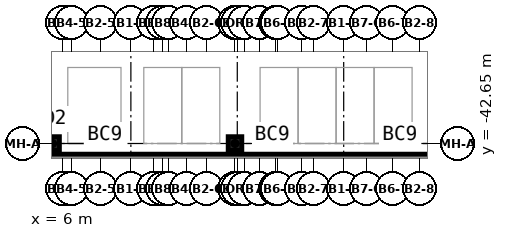
"""IFC4 building model, lengths in metres.
Left out: names, types, materials, properties, quantities, classifications, styles, units other than length and angle.
Written with IfcOpenShell. Run it as: python <this file> out.ifc"""

import sys

from ifc_helpers import new_model, si_unit, direction, frame, frame_2d, origin, origin_2d, place, context, subcontext, project, spatial, rectangle, extrude, source, transform, mapped, element, save


model = new_model("IFC4")
c1 = context("Model", 3, precision=1e-05, world=origin(), true_north=direction((0.0, 1.0)))
c2 = subcontext(c1, "Body", "Model", "MODEL_VIEW")
j1 = project(units=[si_unit("LENGTHUNIT", "METRE"), si_unit("PLANEANGLEUNIT", "RADIAN")], contexts=[c1])
p1 = place(None, origin())
s1 = spatial("IfcSite", under=j1, at=p1, CompositionType="ELEMENT")
p2 = place(p1, origin())
s2 = spatial("IfcBuilding", under=s1, at=p2, CompositionType="ELEMENT")
p3 = place(p2, frame((0.0, 0.0, -4.5)))
s3 = spatial("IfcBuildingStorey", under=s2, at=p3, CompositionType="ELEMENT", Elevation=-4.5)
m1 = source(origin(), c2, "Body", "SweptSolid", [
    extrude(rectangle(XDim=0.9, YDim=0.9, at=origin_2d()), origin(), (0.0, 0.0, 1.0), 4.5),
])
for number, where, z_axis, x_axis in (
    (1, (5.35, -42.65, 0.0), (0.0, 0.0, 1.0), (1.0, 0.0, 0.0)),
    (2, (17.35, -42.65, 0.0), (0.0, 0.0, 1.0), (1.0, 0.0, 0.0)),
):
    element("IfcColumn", number, at=place(p3, frame(where, z_axis=z_axis, x_axis=x_axis)), inside=s3, PredefinedType="COLUMN", context=c2, shape_type="MappedRepresentation", body=[
        mapped(m1, transform((0.0, 0.0, 0.0))),
    ])
m2 = source(origin(), c2, "Body", "SweptSolid", [
    extrude(rectangle(XDim=89.85, YDim=0.5, at=frame_2d((44.925, 0.0))), origin(), (0.0, 0.0, 1.0), 4.5),
])
p4 = place(p3, frame((-57.15, -43.6, 0.0), z_axis=(0.0, 0.0, 1.0), x_axis=(1.0, 0.0, 0.0)))
e3 = element("IfcWall", 3, at=p4, inside=s3, PredefinedType="SOLIDWALL", context=c2, shape_type="MappedRepresentation", body=[
    mapped(m2, transform((0.0, 0.0, 0.0))),
])
save(model, sys.argv[1])
